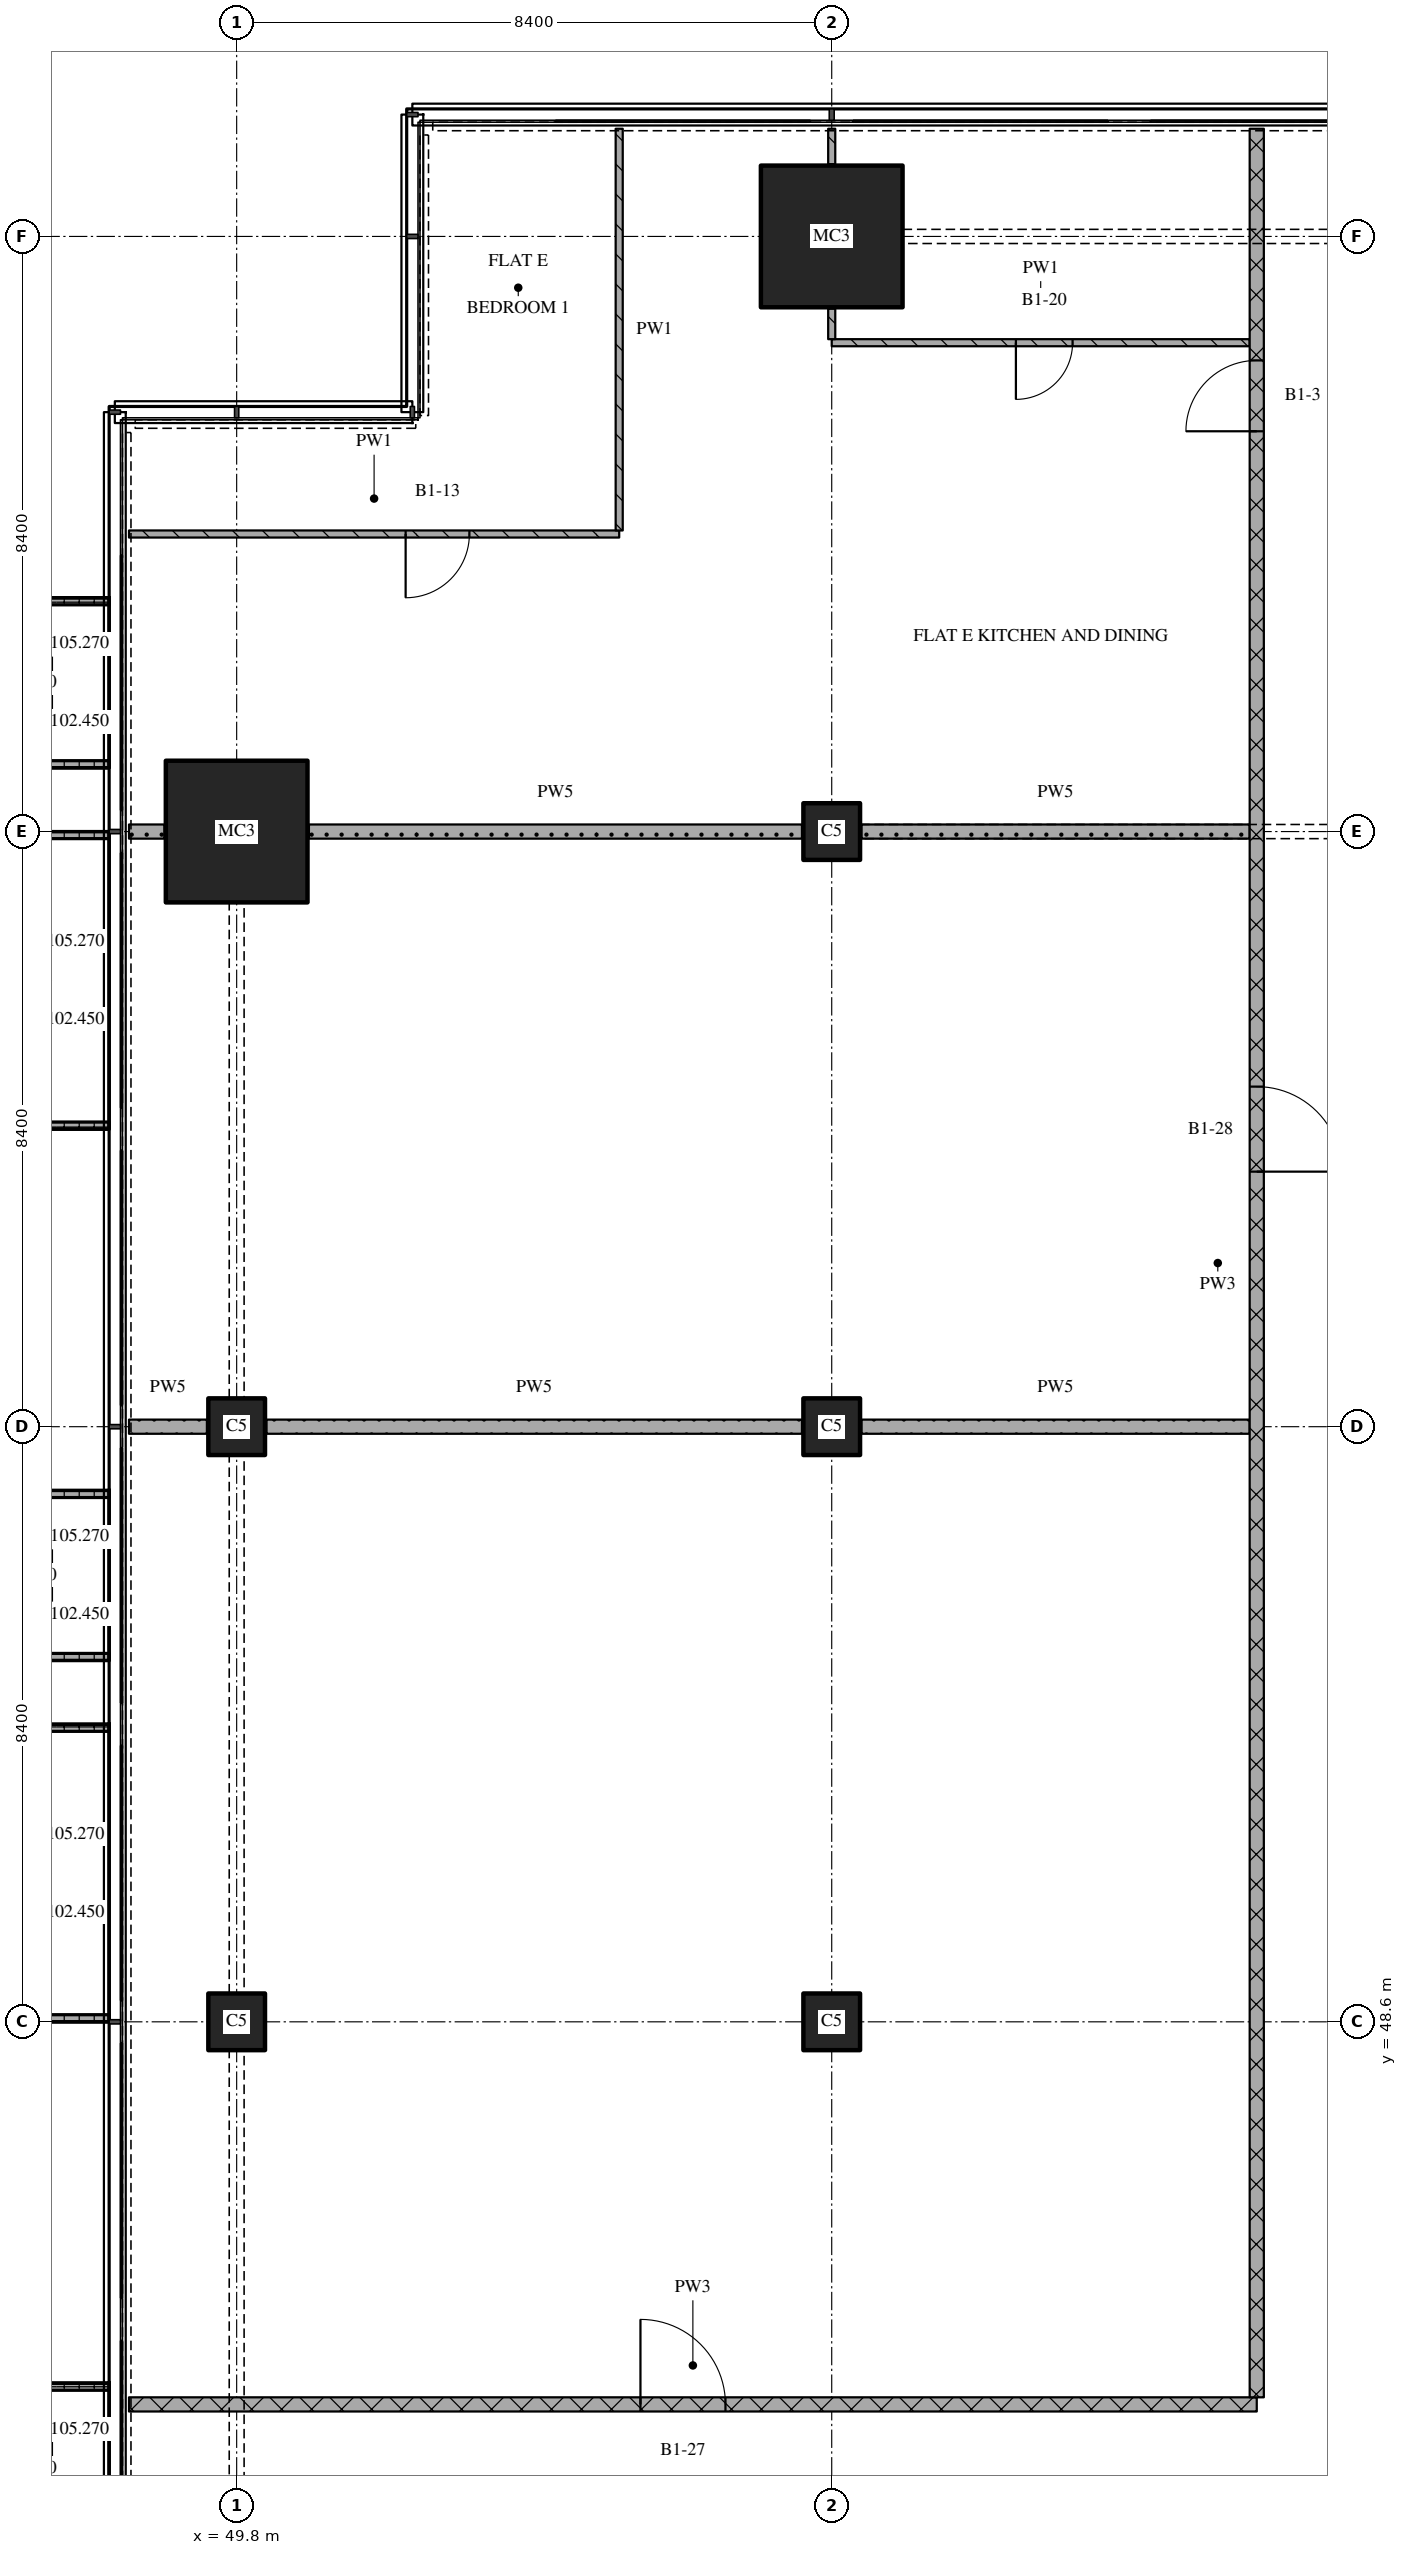
"""IFC4 building model, lengths in metres.
Left out: names, types, materials, properties, quantities, classifications, styles, units other than length and angle.
Written with IfcOpenShell. Run it as: python <this file> out.ifc"""

import sys

from ifc_helpers import new_model, si_unit, direction, frame, frame_2d, origin, origin_2d, place, context, subcontext, project, spatial, polyline, rectangle, outline, extrude, element, fill, save


model = new_model("IFC4")
c1 = context("Model", 3, precision=1e-05, world=origin(), true_north=direction((0.0, 1.0)))
c2 = subcontext(c1, "Body", "Model", "MODEL_VIEW")
j1 = project(units=[si_unit("LENGTHUNIT", "METRE"), si_unit("PLANEANGLEUNIT", "RADIAN")], contexts=[c1])
p1 = place(None, origin())
s1 = spatial("IfcSite", under=j1, at=p1, CompositionType="ELEMENT")
p2 = place(p1, origin())
s2 = spatial("IfcBuilding", under=s1, at=p2, CompositionType="ELEMENT")
p3 = place(p2, frame((0.0, 0.0, 102.45)))
s3 = spatial("IfcBuildingStorey", under=s2, at=p3, CompositionType="ELEMENT", Elevation=102.45)
for number, where, z_axis, x_axis in (
    (1, (49.8, 48.6, 0.0), (0.0, 0.0, 1.0), (1.0, 0.0, 0.0)),
    (2, (49.8, 57.0, 0.0), (0.0, 0.0, 1.0), (1.0, 0.0, 0.0)),
):
    element("IfcColumn", number, at=place(p3, frame(where, z_axis=z_axis, x_axis=x_axis)), inside=s3, PredefinedType="COLUMN", context=c2, shape_type="SweptSolid", body=[
        extrude(rectangle(XDim=0.8, YDim=0.8, at=origin_2d()), origin(), (0.0, 0.0, 1.0), 3.6),
    ])
p4 = place(p3, frame((49.8, 65.4, 0.0), z_axis=(0.0, 0.0, 1.0), x_axis=(1.0, 0.0, 0.0)))
e3 = element("IfcColumn", 3, at=p4, inside=s3, PredefinedType="COLUMN", context=c2, shape_type="SweptSolid", body=[
    extrude(rectangle(XDim=2.0, YDim=2.0, at=origin_2d()), origin(), (0.0, 0.0, 1.0), 3.6),
])
for number, where, z_axis, x_axis in (
    (4, (58.2, 48.6, 0.0), (0.0, 0.0, 1.0), (1.0, 0.0, 0.0)),
    (5, (58.2, 57.0, 0.0), (0.0, 0.0, 1.0), (1.0, 0.0, 0.0)),
    (6, (58.2, 65.4, 0.0), (0.0, 0.0, 1.0), (1.0, 0.0, 0.0)),
):
    element("IfcColumn", number, at=place(p3, frame(where, z_axis=z_axis, x_axis=x_axis)), inside=s3, PredefinedType="COLUMN", context=c2, shape_type="SweptSolid", body=[
        extrude(rectangle(XDim=0.8, YDim=0.8, at=origin_2d()), origin(), (0.0, 0.0, 1.0), 3.6),
    ])
p5 = place(p3, frame((58.2, 73.8, 0.0), z_axis=(0.0, 0.0, 1.0), x_axis=(1.0, 0.0, 0.0)))
e7 = element("IfcColumn", 7, at=p5, inside=s3, PredefinedType="COLUMN", context=c2, shape_type="SweptSolid", body=[
    extrude(rectangle(XDim=2.0, YDim=2.0, at=origin_2d()), origin(), (0.0, 0.0, 1.0), 3.6),
])
p6 = place(p3, origin())
e8 = element("IfcWall", 8, at=p6, inside=s3, PredefinedType="SOLIDWALL", context=c2, shape_type="SweptSolid", body=[
    extrude(outline(polyline([(48.0, 68.7), (48.0, 68.6), (46.5, 68.6), (46.5, 66.4), (48.0, 66.4), (48.0, 66.3), (46.4, 66.3), (46.4, 68.7), (48.0, 68.7)])), origin(), (0.0, 0.0, 1.0), 1.0),
])
p7 = place(p3, origin())
e9 = element("IfcWall", 9, at=p7, inside=s3, PredefinedType="SOLIDWALL", context=c2, shape_type="SweptSolid", body=[
    extrude(outline(polyline([(48.0, 65.4), (48.0, 65.3), (46.367, 65.3), (46.367, 61.3), (48.0, 61.3), (48.0, 61.2), (46.267, 61.2), (46.267, 65.4), (48.0, 65.4)])), origin(), (0.0, 0.0, 1.0), 1.0),
])
p8 = place(p3, origin())
e10 = element("IfcWall", 10, at=p8, inside=s3, PredefinedType="SOLIDWALL", context=c2, shape_type="SweptSolid", body=[
    extrude(outline(polyline([(48.0, 56.1), (48.0, 56.0), (46.5, 56.0), (46.5, 53.8), (48.0, 53.8), (48.0, 53.7), (46.4, 53.7), (46.4, 56.1), (48.0, 56.1)])), origin(), (0.0, 0.0, 1.0), 1.0),
])
p9 = place(p3, origin())
e11 = element("IfcWall", 11, at=p9, inside=s3, PredefinedType="SOLIDWALL", context=c2, shape_type="SweptSolid", body=[
    extrude(outline(polyline([(48.0, 52.8), (48.0, 52.7), (46.367, 52.7), (46.367, 48.7), (48.0, 48.7), (48.0, 48.6), (46.267, 48.6), (46.267, 52.8), (48.0, 52.8)])), origin(), (0.0, 0.0, 1.0), 1.0),
])
p10 = place(p3, origin())
e12 = element("IfcWall", 12, at=p10, inside=s3, PredefinedType="SOLIDWALL", context=c2, shape_type="SweptSolid", body=[
    extrude(outline(polyline([(48.0, 43.5), (48.0, 43.4), (46.5, 43.4), (46.5, 41.2), (48.0, 41.2), (48.0, 41.1), (46.4, 41.1), (46.4, 43.5), (48.0, 43.5)])), origin(), (0.0, 0.0, 1.0), 1.0),
])
p11 = place(p3, frame((48.28, 43.2, 0.0), z_axis=(0.0, 0.0, 1.0), x_axis=(1.0, 0.0, 0.0)))
e13 = element("IfcWall", 13, at=p11, inside=s3, PredefinedType="PARTITIONING", context=c2, shape_type="SweptSolid", body=[
    extrude(rectangle(XDim=15.92, YDim=0.2, at=frame_2d((7.96, 0.0))), origin(), (0.0, 0.0, 1.0), 3.32),
])
p12 = place(p11, frame((7.22, 0.0, 0.0)))
e14 = element("IfcOpeningElement", 14, at=p12, cuts=e13, PredefinedType="OPENING", context=c2, shape_type="SweptSolid", body=[
    extrude(rectangle(XDim=1.2, YDim=2.1, at=frame_2d((0.6, 1.05))), frame((0.0, 0.11, 0.0), z_axis=(0.0, -1.0, 0.0), x_axis=(1.0, 0.0, 0.0)), (0.0, 0.0, 1.0), 0.22),
])
p13 = place(p3, frame((48.28, 57.0, 0.0), z_axis=(0.0, 0.0, 1.0), x_axis=(1.0, 0.0, 0.0)))
e15 = element("IfcWall", 15, at=p13, inside=s3, PredefinedType="PARTITIONING", context=c2, shape_type="SweptSolid", body=[
    extrude(rectangle(XDim=1.1, YDim=0.2, at=frame_2d((0.55, 0.0))), origin(), (0.0, 0.0, 1.0), 3.32),
])
p14 = place(p3, frame((50.22, 57.0, 0.0), z_axis=(0.0, 0.0, 1.0), x_axis=(1.0, 0.0, 0.0)))
e16 = element("IfcWall", 16, at=p14, inside=s3, PredefinedType="PARTITIONING", context=c2, shape_type="SweptSolid", body=[
    extrude(rectangle(XDim=7.56, YDim=0.2, at=frame_2d((3.78, 0.0))), origin(), (0.0, 0.0, 1.0), 3.32),
])
p15 = place(p3, frame((58.62, 57.0, 0.0), z_axis=(0.0, 0.0, 1.0), x_axis=(1.0, 0.0, 0.0)))
e17 = element("IfcWall", 17, at=p15, inside=s3, PredefinedType="PARTITIONING", context=c2, shape_type="SweptSolid", body=[
    extrude(rectangle(XDim=5.48, YDim=0.2, at=frame_2d((2.74, 0.0))), origin(), (0.0, 0.0, 1.0), 3.32),
])
p16 = place(p3, frame((48.28, 65.4, 0.0), z_axis=(0.0, 0.0, 1.0), x_axis=(1.0, 0.0, 0.0)))
e18 = element("IfcWall", 18, at=p16, inside=s3, PredefinedType="PARTITIONING", context=c2, shape_type="SweptSolid", body=[
    extrude(rectangle(XDim=0.5, YDim=0.2, at=frame_2d((0.25, 0.0))), origin(), (0.0, 0.0, 1.0), 3.32),
])
p17 = place(p3, frame((50.82, 65.4, 0.0), z_axis=(0.0, 0.0, 1.0), x_axis=(1.0, 0.0, 0.0)))
e19 = element("IfcWall", 19, at=p17, inside=s3, PredefinedType="PARTITIONING", context=c2, shape_type="SweptSolid", body=[
    extrude(rectangle(XDim=6.96, YDim=0.2, at=frame_2d((3.48, 0.0))), origin(), (0.0, 0.0, 1.0), 3.32),
])
p18 = place(p3, frame((58.62, 65.4, 0.0), z_axis=(0.0, 0.0, 1.0), x_axis=(1.0, 0.0, 0.0)))
e20 = element("IfcWall", 20, at=p18, inside=s3, PredefinedType="PARTITIONING", context=c2, shape_type="SweptSolid", body=[
    extrude(rectangle(XDim=5.48, YDim=0.2, at=frame_2d((2.74, 0.0))), origin(), (0.0, 0.0, 1.0), 2.82),
])
p19 = place(p3, frame((48.28, 69.6, 0.0), z_axis=(0.0, 0.0, 1.0), x_axis=(1.0, 0.0, 0.0)))
e21 = element("IfcWall", 21, at=p19, inside=s3, PredefinedType="PARTITIONING", context=c2, shape_type="SweptSolid", body=[
    extrude(rectangle(XDim=6.92, YDim=0.1, at=frame_2d((3.46, 0.0))), origin(), (0.0, 0.0, 1.0), 3.32),
])
p20 = place(p19, frame((3.905, 0.0, 0.0)))
e22 = element("IfcOpeningElement", 22, at=p20, cuts=e21, PredefinedType="OPENING", context=c2, shape_type="SweptSolid", body=[
    extrude(rectangle(XDim=0.9, YDim=2.1, at=frame_2d((0.45, 1.05))), frame((0.0, 0.06, 0.0), z_axis=(0.0, -1.0, 0.0), x_axis=(1.0, 0.0, 0.0)), (0.0, 0.0, 1.0), 0.12),
])
p21 = place(p3, frame((58.2, 72.3, 0.0), z_axis=(0.0, 0.0, 1.0), x_axis=(1.0, 0.0, 0.0)))
e23 = element("IfcWall", 23, at=p21, inside=s3, PredefinedType="PARTITIONING", context=c2, shape_type="SweptSolid", body=[
    extrude(rectangle(XDim=5.9, YDim=0.1, at=frame_2d((2.95, 0.0))), origin(), (0.0, 0.0, 1.0), 3.32),
])
p22 = place(p21, frame((2.6, 0.0, 0.0)))
e24 = element("IfcOpeningElement", 24, at=p22, cuts=e23, PredefinedType="OPENING", context=c2, shape_type="SweptSolid", body=[
    extrude(rectangle(XDim=0.8, YDim=2.1, at=frame_2d((0.4, 1.05))), frame((0.0, 0.06, 0.0), z_axis=(0.0, -1.0, 0.0), x_axis=(1.0, 0.0, 0.0)), (0.0, 0.0, 1.0), 0.12),
])
p23 = place(p3, frame((55.2, 75.32, 0.0), z_axis=(0.0, 0.0, 1.0), x_axis=(0.0, -1.0, 0.0)))
e25 = element("IfcWall", 25, at=p23, inside=s3, PredefinedType="PARTITIONING", context=c2, shape_type="SweptSolid", body=[
    extrude(rectangle(XDim=5.67, YDim=0.1, at=frame_2d((2.835, 0.0))), origin(), (0.0, 0.0, 1.0), 3.32),
])
p24 = place(p3, frame((58.2, 72.78, 0.0), z_axis=(0.0, 0.0, 1.0), x_axis=(0.0, -1.0, 0.0)))
e26 = element("IfcWall", 26, at=p24, inside=s3, PredefinedType="PARTITIONING", context=c2, shape_type="SweptSolid", body=[
    extrude(rectangle(XDim=0.43, YDim=0.1, at=frame_2d((0.215, 0.0))), origin(), (0.0, 0.0, 1.0), 3.32),
])
p25 = place(p3, frame((58.2, 75.32, 0.0), z_axis=(0.0, 0.0, 1.0), x_axis=(0.0, -1.0, 0.0)))
e27 = element("IfcWall", 27, at=p25, inside=s3, PredefinedType="PARTITIONING", context=c2, shape_type="SweptSolid", body=[
    extrude(rectangle(XDim=0.5, YDim=0.1, at=frame_2d((0.25, 0.0))), origin(), (0.0, 0.0, 1.0), 3.32),
])
p26 = place(p3, frame((64.2, 43.3, 0.0), z_axis=(0.0, 0.0, 1.0), x_axis=(0.0, 1.0, 0.0)))
e28 = element("IfcWall", 28, at=p26, inside=s3, PredefinedType="PARTITIONING", context=c2, shape_type="SweptSolid", body=[
    extrude(rectangle(XDim=32.02, YDim=0.2, at=frame_2d((16.01, 0.0))), origin(), (0.0, 0.0, 1.0), 3.32),
])
p27 = place(p26, frame((17.3, 0.0, 0.0)))
e29 = element("IfcOpeningElement", 29, at=p27, cuts=e28, PredefinedType="OPENING", context=c2, shape_type="SweptSolid", body=[
    extrude(rectangle(XDim=1.2, YDim=2.1, at=frame_2d((0.6, 1.05))), frame((0.0, 0.11, 0.0), z_axis=(0.0, -1.0, 0.0), x_axis=(1.0, 0.0, 0.0)), (0.0, 0.0, 1.0), 0.22),
])
p28 = place(p26, frame((27.75, 0.0, 0.0)))
e30 = element("IfcOpeningElement", 30, at=p28, cuts=e28, PredefinedType="OPENING", context=c2, shape_type="SweptSolid", body=[
    extrude(rectangle(XDim=1.0, YDim=2.1, at=frame_2d((0.5, 1.05))), frame((0.0, 0.11, 0.0), z_axis=(0.0, -1.0, 0.0), x_axis=(1.0, 0.0, 0.0)), (0.0, 0.0, 1.0), 0.22),
])
p29 = place(p12, origin())
e31 = element("IfcDoor", 31, at=p29, inside=s3, OperationType="SINGLE_SWING_LEFT", PredefinedType="DOOR", context=c2, shape_type="SweptSolid", body=[
    extrude(rectangle(XDim=1.2, YDim=2.1, at=frame_2d((0.6, 1.05))), frame((0.0, 0.025, 0.0), z_axis=(0.0, -1.0, 0.0), x_axis=(1.0, 0.0, 0.0)), (0.0, 0.0, 1.0), 0.05),
])
fill(e14, e31)
p30 = place(p20, origin())
e32 = element("IfcDoor", 32, at=p30, inside=s3, OperationType="SINGLE_SWING_RIGHT", PredefinedType="DOOR", context=c2, shape_type="SweptSolid", body=[
    extrude(rectangle(XDim=0.9, YDim=2.1, at=frame_2d((0.45, 1.05))), frame((0.0, 0.025, 0.0), z_axis=(0.0, -1.0, 0.0), x_axis=(1.0, 0.0, 0.0)), (0.0, 0.0, 1.0), 0.05),
])
fill(e22, e32)
p31 = place(p22, origin())
e33 = element("IfcDoor", 33, at=p31, inside=s3, OperationType="SINGLE_SWING_RIGHT", PredefinedType="DOOR", context=c2, shape_type="SweptSolid", body=[
    extrude(rectangle(XDim=0.8, YDim=2.1, at=frame_2d((0.4, 1.05))), frame((0.0, 0.025, 0.0), z_axis=(0.0, -1.0, 0.0), x_axis=(1.0, 0.0, 0.0)), (0.0, 0.0, 1.0), 0.05),
])
fill(e24, e33)
p32 = place(p27, origin())
e34 = element("IfcDoor", 34, at=p32, inside=s3, OperationType="SINGLE_SWING_RIGHT", PredefinedType="DOOR", context=c2, shape_type="SweptSolid", body=[
    extrude(rectangle(XDim=1.2, YDim=2.1, at=frame_2d((0.6, 1.05))), frame((0.0, 0.025, 0.0), z_axis=(0.0, -1.0, 0.0), x_axis=(1.0, 0.0, 0.0)), (0.0, 0.0, 1.0), 0.05),
])
fill(e29, e34)
p33 = place(p28, origin())
e35 = element("IfcDoor", 35, at=p33, inside=s3, OperationType="SINGLE_SWING_LEFT", PredefinedType="DOOR", context=c2, shape_type="SweptSolid", body=[
    extrude(rectangle(XDim=1.0, YDim=2.1, at=frame_2d((0.5, 1.05))), frame((0.0, 0.025, 0.0), z_axis=(0.0, -1.0, 0.0), x_axis=(1.0, 0.0, 0.0)), (0.0, 0.0, 1.0), 0.05),
])
fill(e30, e35)
save(model, sys.argv[1])
